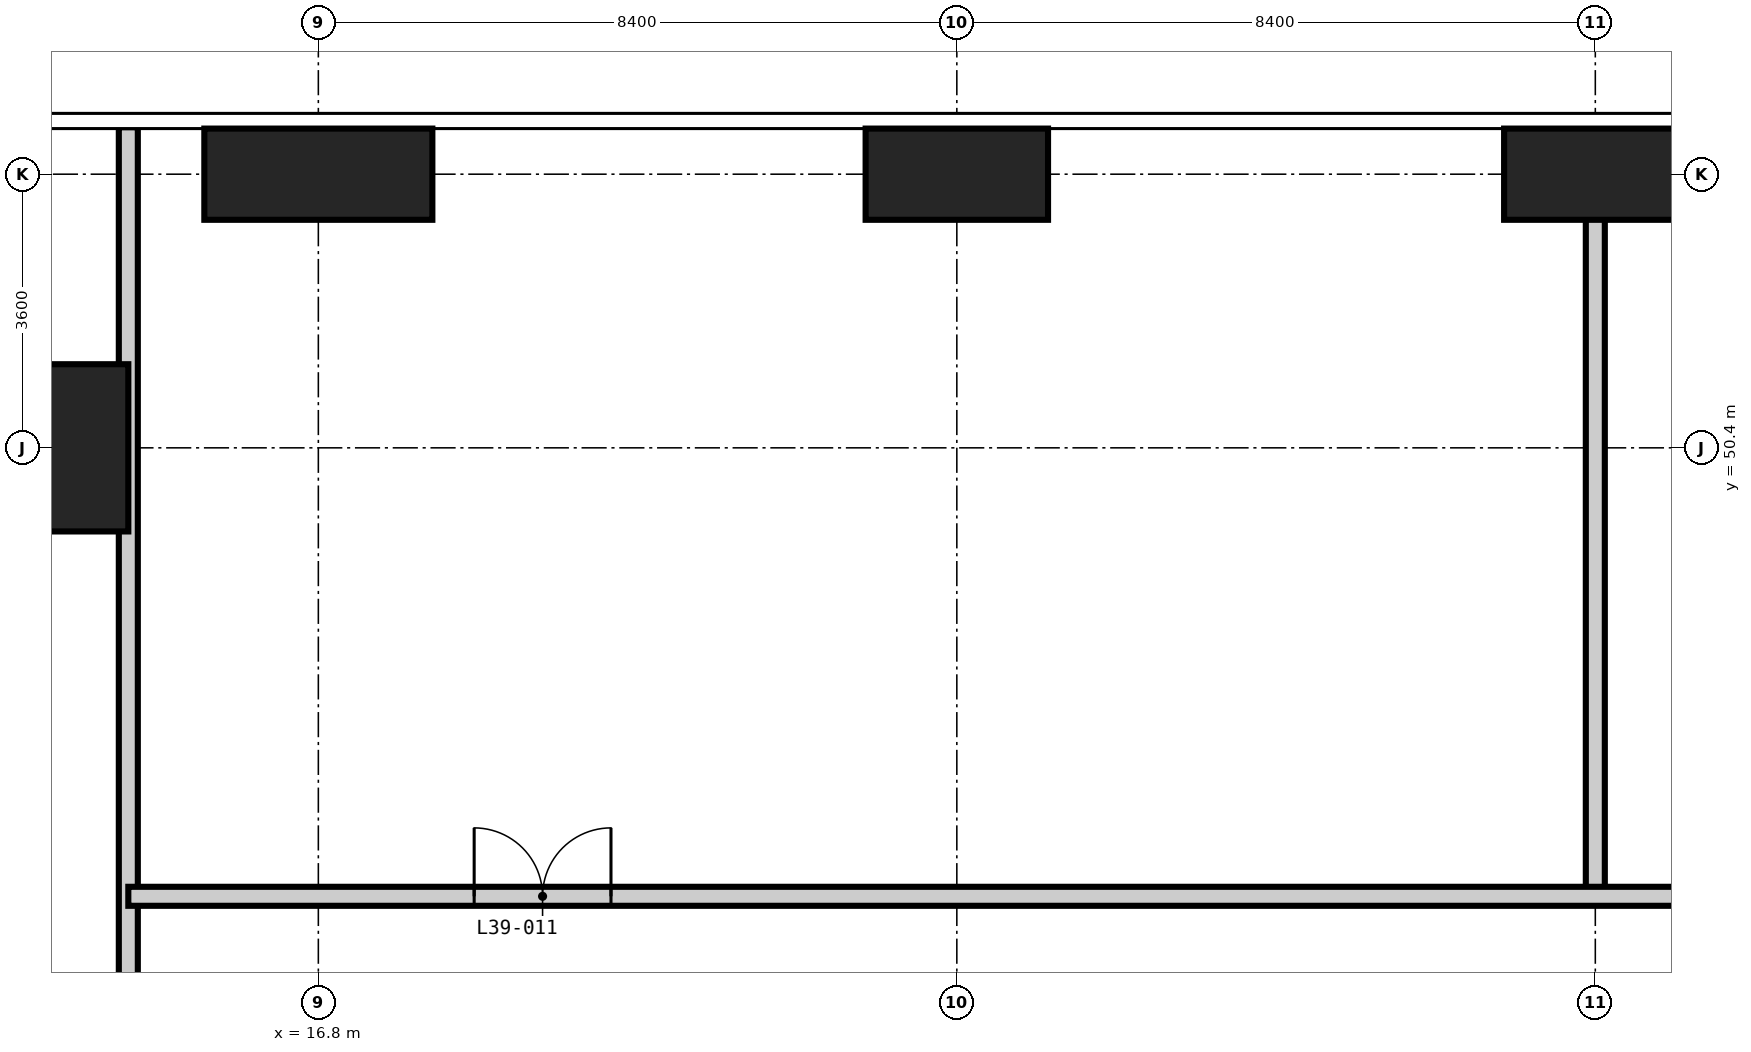
"""IFC4 building model, lengths in metres.
Left out: names, types, materials, properties, quantities, classifications, styles, units other than length and angle.
Written with IfcOpenShell. Run it as: python <this file> out.ifc"""

import sys

from ifc_helpers import new_model, si_unit, direction, frame, frame_2d, origin, origin_2d, place, context, subcontext, project, spatial, rectangle, extrude, element, fill, save


model = new_model("IFC4")
c1 = context("Model", 3, precision=1e-05, world=origin(), true_north=direction((0.0, 1.0)))
c2 = subcontext(c1, "Body", "Model", "MODEL_VIEW")
j1 = project(units=[si_unit("LENGTHUNIT", "METRE"), si_unit("PLANEANGLEUNIT", "RADIAN")], contexts=[c1])
p1 = place(None, origin())
s1 = spatial("IfcSite", under=j1, at=p1, CompositionType="ELEMENT")
p2 = place(p1, origin())
s2 = spatial("IfcBuilding", under=s1, at=p2, CompositionType="ELEMENT")
p3 = place(p2, frame((0.0, 0.0, 153.6)))
s3 = spatial("IfcBuildingStorey", under=s2, at=p3, CompositionType="ELEMENT", Elevation=153.6)
p4 = place(p3, frame((13.2, 50.4, -0.4), z_axis=(0.0, 0.0, 1.0), x_axis=(1.0, 0.0, 0.0)))
e1 = element("IfcColumn", 1, at=p4, inside=s3, PredefinedType="COLUMN", context=c2, shape_type="SweptSolid", body=[
    extrude(rectangle(XDim=2.2, YDim=2.2, at=origin_2d()), origin(), (0.0, 0.0, 1.0), 5.45),
])
p5 = place(p3, frame((16.8, 54.0, -0.4), z_axis=(0.0, 0.0, 1.0), x_axis=(1.0, 0.0, 0.0)))
e2 = element("IfcColumn", 2, at=p5, inside=s3, PredefinedType="COLUMN", context=c2, shape_type="SweptSolid", body=[
    extrude(rectangle(XDim=3.0, YDim=1.2, at=origin_2d()), origin(), (0.0, 0.0, 1.0), 5.45),
])
for number, where, z_axis, x_axis in (
    (3, (25.2, 54.0, -0.4), (0.0, 0.0, 1.0), (1.0, 0.0, 0.0)),
    (4, (33.6, 54.0, -0.4), (0.0, 0.0, 1.0), (1.0, 0.0, 0.0)),
):
    element("IfcColumn", number, at=place(p3, frame(where, z_axis=z_axis, x_axis=x_axis)), inside=s3, PredefinedType="COLUMN", context=c2, shape_type="SweptSolid", body=[
        extrude(rectangle(XDim=2.4, YDim=1.2, at=origin_2d()), origin(), (0.0, 0.0, 1.0), 5.45),
    ])
p6 = place(p3, frame((14.3, -0.018, 0.0), z_axis=(0.0, 0.0, 1.0), x_axis=(0.0, 1.0, 0.0)))
e5 = element("IfcWall", 5, at=p6, inside=s3, PredefinedType="PARTITIONING", context=c2, shape_type="SweptSolid", body=[
    extrude(rectangle(XDim=54.636, YDim=0.25, at=frame_2d((27.318, 0.0))), origin(), (0.0, 0.0, 1.0), 5.05),
])
p7 = place(p6, frame((22.168, 0.0, 0.0)))
e6 = element("IfcOpeningElement", 6, at=p7, cuts=e5, PredefinedType="OPENING", context=c2, shape_type="SweptSolid", body=[
    extrude(rectangle(XDim=1.8, YDim=2.4, at=frame_2d((0.9, 1.2))), frame((0.0, 0.135, 0.0), z_axis=(0.0, -1.0, 0.0), x_axis=(1.0, 0.0, 0.0)), (0.0, 0.0, 1.0), 0.27),
])
p8 = place(p6, frame((38.168, 0.0, 0.0)))
e7 = element("IfcOpeningElement", 7, at=p8, cuts=e5, PredefinedType="OPENING", context=c2, shape_type="SweptSolid", body=[
    extrude(rectangle(XDim=1.8, YDim=2.4, at=frame_2d((0.9, 1.2))), frame((0.0, 0.135, 0.0), z_axis=(0.0, -1.0, 0.0), x_axis=(1.0, 0.0, 0.0)), (0.0, 0.0, 1.0), 0.27),
])
p9 = place(p3, frame((33.6, 44.5, 0.0), z_axis=(0.0, 0.0, 1.0), x_axis=(0.0, 1.0, 0.0)))
e8 = element("IfcWall", 8, at=p9, inside=s3, PredefinedType="PARTITIONING", context=c2, shape_type="SweptSolid", body=[
    extrude(rectangle(XDim=10.118, YDim=0.25, at=frame_2d((5.059, 0.0))), origin(), (0.0, 0.0, 1.0), 5.05),
])
p10 = place(p3, frame((14.3, 44.5, 0.0), z_axis=(0.0, 0.0, 1.0), x_axis=(1.0, 0.0, 0.0)))
e9 = element("IfcWall", 9, at=p10, inside=s3, PredefinedType="PARTITIONING", context=c2, shape_type="SweptSolid", body=[
    extrude(rectangle(XDim=30.2, YDim=0.25, at=frame_2d((15.1, 0.0))), origin(), (0.0, 0.0, 1.0), 5.05),
])
p11 = place(p10, frame((4.55, 0.0, 0.0)))
e10 = element("IfcOpeningElement", 10, at=p11, cuts=e9, PredefinedType="OPENING", context=c2, shape_type="SweptSolid", body=[
    extrude(rectangle(XDim=1.8, YDim=2.4, at=frame_2d((0.9, 1.2))), frame((0.0, 0.135, 0.0), z_axis=(0.0, -1.0, 0.0), x_axis=(1.0, 0.0, 0.0)), (0.0, 0.0, 1.0), 0.27),
])
p12 = place(p10, frame((23.85, 0.0, 0.0)))
e11 = element("IfcOpeningElement", 11, at=p12, cuts=e9, PredefinedType="OPENING", context=c2, shape_type="SweptSolid", body=[
    extrude(rectangle(XDim=1.8, YDim=2.4, at=frame_2d((0.9, 1.2))), frame((0.0, 0.135, 0.0), z_axis=(0.0, -1.0, 0.0), x_axis=(1.0, 0.0, 0.0)), (0.0, 0.0, 1.0), 0.27),
])
p13 = place(p11, origin())
e12 = element("IfcDoor", 12, at=p13, inside=s3, OperationType="DOUBLE_DOOR_DOUBLE_SWING", PredefinedType="DOOR", context=c2, shape_type="SweptSolid", body=[
    extrude(rectangle(XDim=1.8, YDim=2.4, at=frame_2d((0.9, 1.2))), frame((0.0, 0.025, 0.0), z_axis=(0.0, -1.0, 0.0), x_axis=(1.0, 0.0, 0.0)), (0.0, 0.0, 1.0), 0.05),
])
fill(e10, e12)
save(model, sys.argv[1])
